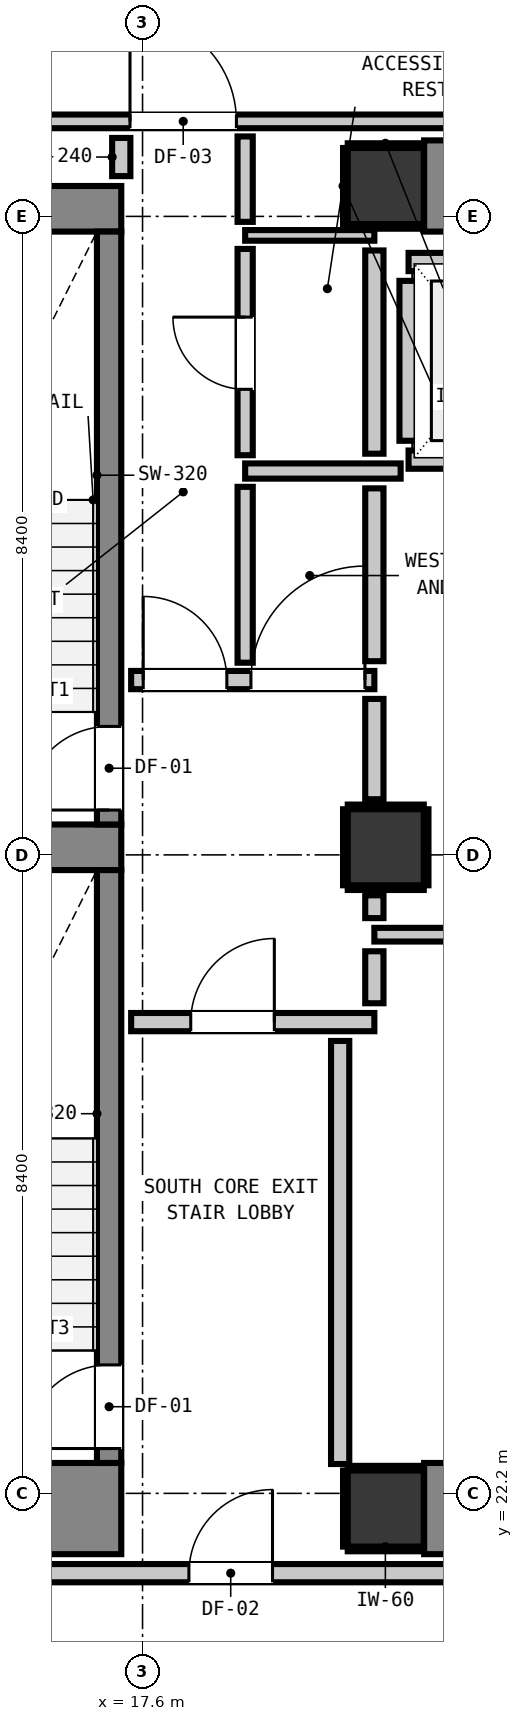
"""IFC4 building model, lengths in metres.
Left out: names, types, materials, properties, quantities, classifications, styles, units other than length and angle.
Written with IfcOpenShell. Run it as: python <this file> out.ifc"""

import sys

from ifc_helpers import new_model, si_unit, direction, frame, frame_2d, origin, origin_2d, place, context, subcontext, project, spatial, rectangle, extrude, element, fill, save


model = new_model("IFC4")
c1 = context("Model", 3, precision=1e-05, world=origin(), true_north=direction((0.0, 1.0)))
c2 = subcontext(c1, "Body", "Model", "MODEL_VIEW")
j1 = project(units=[si_unit("LENGTHUNIT", "METRE"), si_unit("PLANEANGLEUNIT", "RADIAN")], contexts=[c1])
p1 = place(None, origin())
s1 = spatial("IfcSite", under=j1, at=p1, CompositionType="ELEMENT")
p2 = place(p1, origin())
s2 = spatial("IfcBuilding", under=s1, at=p2, CompositionType="ELEMENT")
p3 = place(p2, frame((0.0, 0.0, 48.56)))
s3 = spatial("IfcBuildingStorey", under=s2, at=p3, CompositionType="ELEMENT", Elevation=48.56)
for number, where, z_axis, x_axis in (
    (1, (20.8, 22.0, 0.0), (0.0, 0.0, 1.0), (1.0, 0.0, 0.0)),
    (2, (20.8, 39.4, 0.0), (0.0, 0.0, 1.0), (1.0, 0.0, 0.0)),
):
    element("IfcColumn", number, at=place(p3, frame(where, z_axis=z_axis, x_axis=x_axis)), inside=s3, PredefinedType="COLUMN", context=c2, shape_type="SweptSolid", body=[
        extrude(rectangle(XDim=1.0, YDim=1.0, at=origin_2d()), origin(), (0.0, 0.0, 1.0), 3.32),
    ])
p4 = place(p3, frame((13.24, 22.0, 0.0), z_axis=(0.0, 0.0, 1.0), x_axis=(1.0, 0.0, 0.0)))
e3 = element("IfcWall", 3, at=p4, inside=s3, PredefinedType="SHEAR", context=c2, shape_type="SweptSolid", body=[
    extrude(rectangle(XDim=4.08, YDim=1.2, at=frame_2d((2.04, 0.0))), origin(), (0.0, 0.0, 1.0), 3.32),
])
p5 = place(p3, frame((13.24, 39.1, 0.0), z_axis=(0.0, 0.0, 1.0), x_axis=(1.0, 0.0, 0.0)))
e4 = element("IfcWall", 4, at=p5, inside=s3, PredefinedType="SHEAR", context=c2, shape_type="SweptSolid", body=[
    extrude(rectangle(XDim=4.08, YDim=0.6, at=frame_2d((2.04, 0.0))), origin(), (0.0, 0.0, 1.0), 3.32),
])
p6 = place(p3, frame((13.905, 30.7, 0.0), z_axis=(0.0, 0.0, 1.0), x_axis=(1.0, 0.0, 0.0)))
e5 = element("IfcWall", 5, at=p6, inside=s3, PredefinedType="SHEAR", context=c2, shape_type="SweptSolid", body=[
    extrude(rectangle(XDim=3.415, YDim=0.6, at=frame_2d((1.708, 0.0))), origin(), (0.0, 0.0, 1.0), 3.32),
])
for number, where, z_axis, x_axis in (
    (6, (21.305, 22.0, 0.0), (0.0, 0.0, 1.0), (1.0, 0.0, 0.0)),
    (7, (21.305, 39.4, 0.0), (0.0, 0.0, 1.0), (1.0, 0.0, 0.0)),
):
    element("IfcWall", number, at=place(p3, frame(where, z_axis=z_axis, x_axis=x_axis)), inside=s3, PredefinedType="SHEAR", context=c2, shape_type="SweptSolid", body=[
        extrude(rectangle(XDim=7.39, YDim=1.2, at=frame_2d((3.695, 0.0))), origin(), (0.0, 0.0, 1.0), 3.32),
    ])
p7 = place(p3, frame((17.16, 31.0, 0.0), z_axis=(0.0, 0.0, 1.0), x_axis=(0.0, 1.0, 0.0)))
e8 = element("IfcWall", 8, at=p7, inside=s3, PredefinedType="SHEAR", context=c2, shape_type="SweptSolid", body=[
    extrude(rectangle(XDim=7.8, YDim=0.32, at=frame_2d((3.9, 0.0))), origin(), (0.0, 0.0, 1.0), 3.32),
])
p8 = place(p7, frame((0.19, 0.0, 0.0)))
e9 = element("IfcOpeningElement", 9, at=p8, cuts=e8, PredefinedType="OPENING", context=c2, shape_type="SweptSolid", body=[
    extrude(rectangle(XDim=1.1, YDim=2.15, at=frame_2d((0.55, 1.075))), frame((0.0, 0.17, 0.0), z_axis=(0.0, -1.0, 0.0), x_axis=(1.0, 0.0, 0.0)), (0.0, 0.0, 1.0), 0.34),
])
p9 = place(p3, frame((17.16, 22.6, 0.0), z_axis=(0.0, 0.0, 1.0), x_axis=(0.0, 1.0, 0.0)))
e10 = element("IfcWall", 10, at=p9, inside=s3, PredefinedType="SHEAR", context=c2, shape_type="SweptSolid", body=[
    extrude(rectangle(XDim=7.8, YDim=0.32, at=frame_2d((3.9, 0.0))), origin(), (0.0, 0.0, 1.0), 3.32),
])
p10 = place(p9, frame((0.19, 0.0, 0.0)))
e11 = element("IfcOpeningElement", 11, at=p10, cuts=e10, PredefinedType="OPENING", context=c2, shape_type="SweptSolid", body=[
    extrude(rectangle(XDim=1.1, YDim=2.15, at=frame_2d((0.55, 1.075))), frame((0.0, 0.17, 0.0), z_axis=(0.0, -1.0, 0.0), x_axis=(1.0, 0.0, 0.0)), (0.0, 0.0, 1.0), 0.34),
])
p11 = place(p3, frame((20.8, 30.7, 0.0), z_axis=(0.0, 0.0, 1.0), x_axis=(1.0, 0.0, 0.0)))
e12 = element("IfcColumn", 12, at=p11, inside=s3, PredefinedType="COLUMN", context=c2, shape_type="SweptSolid", body=[
    extrude(rectangle(XDim=1.0, YDim=1.0, at=origin_2d()), origin(), (0.0, 0.0, 1.0), 3.32),
])
for number, where, z_axis, x_axis in (
    (13, (21.1, 35.8, 0.0), (0.0, 0.0, 1.0), (1.0, 0.0, 0.0)),
    (14, (21.1, 38.4, 0.0), (0.0, 0.0, 1.0), (1.0, 0.0, 0.0)),
):
    element("IfcWall", number, at=place(p3, frame(where, z_axis=z_axis, x_axis=x_axis)), inside=s3, PredefinedType="PARTITIONING", context=c2, shape_type="SweptSolid", body=[
        extrude(rectangle(XDim=2.2, YDim=0.24, at=frame_2d((1.1, 0.0))), origin(), (0.0, 0.0, 1.0), 3.06),
    ])
p12 = place(p3, frame((21.1, 36.048, 0.0), z_axis=(0.0, 0.0, 1.0), x_axis=(0.0, 1.0, 0.0)))
e15 = element("IfcWall", 15, at=p12, inside=s3, PredefinedType="PARTITIONING", context=c2, shape_type="SweptSolid", body=[
    extrude(rectangle(XDim=2.104, YDim=0.24, at=frame_2d((1.052, 0.0))), origin(), (0.0, 0.0, 1.0), 2.295),
])
p13 = place(p3, frame((10.15, 21.15, 0.0), z_axis=(0.0, 0.0, 1.0), x_axis=(1.0, 0.0, 0.0)))
e16 = element("IfcWall", 16, at=p13, inside=s3, PredefinedType="PARTITIONING", context=c2, shape_type="SweptSolid", body=[
    extrude(rectangle(XDim=40.023, YDim=0.24, at=frame_2d((20.012, 0.0))), origin(), (0.0, 0.0, 1.0), 3.06),
])
p14 = place(p13, frame((8.06, 0.0, 0.0)))
e17 = element("IfcOpeningElement", 17, at=p14, cuts=e16, PredefinedType="OPENING", context=c2, shape_type="SweptSolid", body=[
    extrude(rectangle(XDim=1.1, YDim=2.15, at=frame_2d((0.55, 1.075))), frame((0.0, 0.13, 0.0), z_axis=(0.0, -1.0, 0.0), x_axis=(1.0, 0.0, 0.0)), (0.0, 0.0, 1.0), 0.26),
])
p15 = place(p13, frame((0.324, 0.0, 0.0)))
e18 = element("IfcOpeningElement", 18, at=p15, cuts=e16, PredefinedType="OPENING", context=c2, shape_type="SweptSolid", body=[
    extrude(rectangle(XDim=1.4, YDim=2.15, at=frame_2d((0.7, 1.075))), frame((0.0, 0.13, 0.0), z_axis=(0.0, -1.0, 0.0), x_axis=(1.0, 0.0, 0.0)), (0.0, 0.0, 1.0), 0.26),
])
p16 = place(p13, frame((33.351, 0.0, 0.0)))
e19 = element("IfcOpeningElement", 19, at=p16, cuts=e16, PredefinedType="OPENING", context=c2, shape_type="SweptSolid", body=[
    extrude(rectangle(XDim=0.9, YDim=2.1, at=frame_2d((0.45, 1.05))), frame((0.0, 0.13, 0.0), z_axis=(0.0, -1.0, 0.0), x_axis=(1.0, 0.0, 0.0)), (0.0, 0.0, 1.0), 0.26),
])
p17 = place(p3, frame((17.45, 28.4, 0.0), z_axis=(0.0, 0.0, 1.0), x_axis=(1.0, 0.0, 0.0)))
e20 = element("IfcWall", 20, at=p17, inside=s3, PredefinedType="PARTITIONING", context=c2, shape_type="SweptSolid", body=[
    extrude(rectangle(XDim=3.2, YDim=0.24, at=frame_2d((1.6, 0.0))), origin(), (0.0, 0.0, 1.0), 3.06),
])
p18 = place(p17, frame((0.784, 0.0, 0.0)))
e21 = element("IfcOpeningElement", 21, at=p18, cuts=e20, PredefinedType="OPENING", context=c2, shape_type="SweptSolid", body=[
    extrude(rectangle(XDim=1.1, YDim=2.15, at=frame_2d((0.55, 1.075))), frame((0.0, 0.13, 0.0), z_axis=(0.0, -1.0, 0.0), x_axis=(1.0, 0.0, 0.0)), (0.0, 0.0, 1.0), 0.26),
])
p19 = place(p3, frame((17.45, 32.9, 0.0), z_axis=(0.0, 0.0, 1.0), x_axis=(1.0, 0.0, 0.0)))
e22 = element("IfcWall", 22, at=p19, inside=s3, PredefinedType="PARTITIONING", context=c2, shape_type="SweptSolid", body=[
    extrude(rectangle(XDim=3.2, YDim=0.24, at=frame_2d((1.6, 0.0))), origin(), (0.0, 0.0, 1.0), 3.06),
])
p20 = place(p19, frame((0.159, 0.0, 0.0)))
e23 = element("IfcOpeningElement", 23, at=p20, cuts=e22, PredefinedType="OPENING", context=c2, shape_type="SweptSolid", body=[
    extrude(rectangle(XDim=1.1, YDim=2.15, at=frame_2d((0.55, 1.075))), frame((0.0, 0.13, 0.0), z_axis=(0.0, -1.0, 0.0), x_axis=(1.0, 0.0, 0.0)), (0.0, 0.0, 1.0), 0.26),
])
p21 = place(p19, frame((1.576, 0.0, 0.0)))
e24 = element("IfcOpeningElement", 24, at=p21, cuts=e22, PredefinedType="OPENING", context=c2, shape_type="SweptSolid", body=[
    extrude(rectangle(XDim=1.5, YDim=2.15, at=frame_2d((0.75, 1.075))), frame((0.0, 0.13, 0.0), z_axis=(0.0, -1.0, 0.0), x_axis=(1.0, 0.0, 0.0)), (0.0, 0.0, 1.0), 0.26),
])
p22 = place(p3, frame((18.95, 35.65, 0.0), z_axis=(0.0, 0.0, 1.0), x_axis=(1.0, 0.0, 0.0)))
e25 = element("IfcWall", 25, at=p22, inside=s3, PredefinedType="PARTITIONING", context=c2, shape_type="SweptSolid", body=[
    extrude(rectangle(XDim=2.046, YDim=0.2, at=frame_2d((1.023, 0.0))), origin(), (0.0, 0.0, 1.0), 3.06),
])
p23 = place(p3, frame((20.65, 29.55, 0.0), z_axis=(0.0, 0.0, 1.0), x_axis=(1.0, 0.0, 0.0)))
e26 = element("IfcWall", 26, at=p23, inside=s3, PredefinedType="PARTITIONING", context=c2, shape_type="SweptSolid", body=[
    extrude(rectangle(XDim=9.325, YDim=0.18, at=frame_2d((4.663, 0.0))), origin(), (0.0, 0.0, 1.0), 3.06),
])
p24 = place(p3, frame((10.15, 40.25, 0.0), z_axis=(0.0, 0.0, 1.0), x_axis=(1.0, 0.0, 0.0)))
e27 = element("IfcWall", 27, at=p24, inside=s3, PredefinedType="PARTITIONING", context=c2, shape_type="SweptSolid", body=[
    extrude(rectangle(XDim=26.782, YDim=0.18, at=frame_2d((13.391, 0.0))), origin(), (0.0, 0.0, 1.0), 3.06),
])
p25 = place(p24, frame((7.285, 0.0, 0.0)))
e28 = element("IfcOpeningElement", 28, at=p25, cuts=e27, PredefinedType="OPENING", context=c2, shape_type="SweptSolid", body=[
    extrude(rectangle(XDim=1.4, YDim=2.15, at=frame_2d((0.7, 1.075))), frame((0.0, 0.1, 0.0), z_axis=(0.0, -1.0, 0.0), x_axis=(1.0, 0.0, 0.0)), (0.0, 0.0, 1.0), 0.2),
])
p26 = place(p24, frame((0.324, 0.0, 0.0)))
e29 = element("IfcOpeningElement", 29, at=p26, cuts=e27, PredefinedType="OPENING", context=c2, shape_type="SweptSolid", body=[
    extrude(rectangle(XDim=1.4, YDim=2.15, at=frame_2d((0.7, 1.075))), frame((0.0, 0.1, 0.0), z_axis=(0.0, -1.0, 0.0), x_axis=(1.0, 0.0, 0.0)), (0.0, 0.0, 1.0), 0.2),
])
p27 = place(p3, frame((18.95, 38.75, 0.0), z_axis=(0.0, 0.0, 1.0), x_axis=(1.0, 0.0, 0.0)))
e30 = element("IfcWall", 30, at=p27, inside=s3, PredefinedType="PARTITIONING", context=c2, shape_type="SweptSolid", body=[
    extrude(rectangle(XDim=1.7, YDim=0.14, at=frame_2d((0.85, 0.0))), origin(), (0.0, 0.0, 1.0), 3.06),
])
p28 = place(p3, frame((17.32, 39.53, 0.0), z_axis=(0.0, 0.0, 1.0), x_axis=(0.0, 1.0, 0.0)))
e31 = element("IfcWall", 31, at=p28, inside=s3, PredefinedType="PARTITIONING", context=c2, shape_type="SweptSolid", body=[
    extrude(rectangle(XDim=0.502, YDim=0.24, at=frame_2d((0.251, 0.0))), origin(), (0.0, 0.0, 1.0), 3.06),
])
p29 = place(p3, frame((20.2, 22.586, 0.0), z_axis=(0.0, 0.0, 1.0), x_axis=(0.0, 1.0, 0.0)))
e32 = element("IfcWall", 32, at=p29, inside=s3, PredefinedType="PARTITIONING", context=c2, shape_type="SweptSolid", body=[
    extrude(rectangle(XDim=5.566, YDim=0.24, at=frame_2d((2.783, 0.0))), origin(), (0.0, 0.0, 1.0), 3.06),
])
p30 = place(p3, frame((20.65, 28.648, 0.0), z_axis=(0.0, 0.0, 1.0), x_axis=(0.0, 1.0, 0.0)))
e33 = element("IfcWall", 33, at=p30, inside=s3, PredefinedType="PARTITIONING", context=c2, shape_type="SweptSolid", body=[
    extrude(rectangle(XDim=0.684, YDim=0.24, at=frame_2d((0.342, 0.0))), origin(), (0.0, 0.0, 1.0), 2.295),
])
p31 = place(p3, frame((20.65, 29.768, 0.0), z_axis=(0.0, 0.0, 1.0), x_axis=(0.0, 1.0, 0.0)))
e34 = element("IfcWall", 34, at=p31, inside=s3, PredefinedType="PARTITIONING", context=c2, shape_type="SweptSolid", body=[
    extrude(rectangle(XDim=0.3, YDim=0.24, at=frame_2d((0.15, 0.0))), origin(), (0.0, 0.0, 1.0), 2.295),
])
p32 = place(p3, frame((20.65, 31.332, 0.0), z_axis=(0.0, 0.0, 1.0), x_axis=(0.0, 1.0, 0.0)))
e35 = element("IfcWall", 35, at=p32, inside=s3, PredefinedType="PARTITIONING", context=c2, shape_type="SweptSolid", body=[
    extrude(rectangle(XDim=1.32, YDim=0.24, at=frame_2d((0.66, 0.0))), origin(), (0.0, 0.0, 1.0), 2.295),
])
p33 = place(p3, frame((20.65, 33.148, 0.0), z_axis=(0.0, 0.0, 1.0), x_axis=(0.0, 1.0, 0.0)))
e36 = element("IfcWall", 36, at=p33, inside=s3, PredefinedType="PARTITIONING", context=c2, shape_type="SweptSolid", body=[
    extrude(rectangle(XDim=2.274, YDim=0.24, at=frame_2d((1.137, 0.0))), origin(), (0.0, 0.0, 1.0), 2.295),
])
p34 = place(p3, frame((20.65, 35.878, 0.0), z_axis=(0.0, 0.0, 1.0), x_axis=(0.0, 1.0, 0.0)))
e37 = element("IfcWall", 37, at=p34, inside=s3, PredefinedType="PARTITIONING", context=c2, shape_type="SweptSolid", body=[
    extrude(rectangle(XDim=2.674, YDim=0.24, at=frame_2d((1.337, 0.0))), origin(), (0.0, 0.0, 1.0), 2.295),
])
p35 = place(p3, frame((18.95, 33.128, 0.0), z_axis=(0.0, 0.0, 1.0), x_axis=(0.0, 1.0, 0.0)))
e38 = element("IfcWall", 38, at=p35, inside=s3, PredefinedType="PARTITIONING", context=c2, shape_type="SweptSolid", body=[
    extrude(rectangle(XDim=2.314, YDim=0.2, at=frame_2d((1.157, 0.0))), origin(), (0.0, 0.0, 1.0), 3.06),
])
p36 = place(p3, frame((18.95, 35.858, 0.0), z_axis=(0.0, 0.0, 1.0), x_axis=(0.0, 1.0, 0.0)))
e39 = element("IfcWall", 39, at=p36, inside=s3, PredefinedType="PARTITIONING", context=c2, shape_type="SweptSolid", body=[
    extrude(rectangle(XDim=2.714, YDim=0.2, at=frame_2d((1.357, 0.0))), origin(), (0.0, 0.0, 1.0), 3.06),
])
p37 = place(p36, frame((0.867, 0.0, 0.0)))
e40 = element("IfcOpeningElement", 40, at=p37, cuts=e39, PredefinedType="OPENING", context=c2, shape_type="SweptSolid", body=[
    extrude(rectangle(XDim=0.95, YDim=2.1, at=frame_2d((0.475, 1.05))), frame((0.0, 0.11, 0.0), z_axis=(0.0, -1.0, 0.0), x_axis=(1.0, 0.0, 0.0)), (0.0, 0.0, 1.0), 0.22),
])
p38 = place(p3, frame((18.95, 38.928, 0.0), z_axis=(0.0, 0.0, 1.0), x_axis=(0.0, 1.0, 0.0)))
e41 = element("IfcWall", 41, at=p38, inside=s3, PredefinedType="PARTITIONING", context=c2, shape_type="SweptSolid", body=[
    extrude(rectangle(XDim=1.124, YDim=0.2, at=frame_2d((0.562, 0.0))), origin(), (0.0, 0.0, 1.0), 3.06),
])
for number, where, z_axis, x_axis in (
    (42, (20.3, 21.468, 0.0), (0.0, 0.0, 1.0), (1.0, 0.0, 0.0)),
    (43, (20.3, 22.532, 0.0), (0.0, 0.0, 1.0), (1.0, 0.0, 0.0)),
):
    element("IfcWall", number, at=place(p3, frame(where, z_axis=z_axis, x_axis=x_axis)), inside=s3, PredefinedType="PARTITIONING", context=c2, shape_type="SweptSolid", body=[
        extrude(rectangle(XDim=0.99, YDim=0.06, at=frame_2d((0.495, 0.0))), origin(), (0.0, 0.0, 1.0), 1.45),
    ])
p39 = place(p3, frame((20.268, 21.5, 0.0), z_axis=(0.0, 0.0, 1.0), x_axis=(0.0, 1.0, 0.0)))
e44 = element("IfcWall", 44, at=p39, inside=s3, PredefinedType="PARTITIONING", context=c2, shape_type="SweptSolid", body=[
    extrude(rectangle(XDim=1.0, YDim=0.06, at=frame_2d((0.5, 0.0))), origin(), (0.0, 0.0, 1.0), 1.45),
])
for number, where, z_axis, x_axis in (
    (45, (20.3, 38.868, 0.0), (0.0, 0.0, 1.0), (1.0, 0.0, 0.0)),
    (46, (20.3, 39.932, 0.0), (0.0, 0.0, 1.0), (1.0, 0.0, 0.0)),
):
    element("IfcWall", number, at=place(p3, frame(where, z_axis=z_axis, x_axis=x_axis)), inside=s3, PredefinedType="PARTITIONING", context=c2, shape_type="SweptSolid", body=[
        extrude(rectangle(XDim=0.99, YDim=0.06, at=frame_2d((0.495, 0.0))), origin(), (0.0, 0.0, 1.0), 1.45),
    ])
for number, where, z_axis, x_axis in (
    (47, (20.268, 38.9, 0.0), (0.0, 0.0, 1.0), (0.0, 1.0, 0.0)),
    (48, (20.3, 30.168, 0.0), (0.0, 0.0, 1.0), (1.0, 0.0, 0.0)),
    (49, (20.3, 31.232, 0.0), (0.0, 0.0, 1.0), (1.0, 0.0, 0.0)),
    (50, (20.268, 30.2, 0.0), (0.0, 0.0, 1.0), (0.0, 1.0, 0.0)),
    (51, (21.332, 30.2, 0.0), (0.0, 0.0, 1.0), (0.0, 1.0, 0.0)),
):
    element("IfcWall", number, at=place(p3, frame(where, z_axis=z_axis, x_axis=x_axis)), inside=s3, PredefinedType="PARTITIONING", context=c2, shape_type="SweptSolid", body=[
        extrude(rectangle(XDim=1.0, YDim=0.06, at=frame_2d((0.5, 0.0))), origin(), (0.0, 0.0, 1.0), 1.45),
    ])
p40 = place(p8, origin())
e52 = element("IfcDoor", 52, at=p40, inside=s3, OperationType="SINGLE_SWING_LEFT", PredefinedType="DOOR", context=c2, shape_type="SweptSolid", body=[
    extrude(rectangle(XDim=1.1, YDim=2.15, at=frame_2d((0.55, 1.075))), frame((0.0, 0.025, 0.0), z_axis=(0.0, -1.0, 0.0), x_axis=(1.0, 0.0, 0.0)), (0.0, 0.0, 1.0), 0.05),
])
fill(e9, e52)
p41 = place(p10, origin())
e53 = element("IfcDoor", 53, at=p41, inside=s3, OperationType="SINGLE_SWING_LEFT", PredefinedType="DOOR", context=c2, shape_type="SweptSolid", body=[
    extrude(rectangle(XDim=1.1, YDim=2.15, at=frame_2d((0.55, 1.075))), frame((0.0, 0.025, 0.0), z_axis=(0.0, -1.0, 0.0), x_axis=(1.0, 0.0, 0.0)), (0.0, 0.0, 1.0), 0.05),
])
fill(e11, e53)
p42 = place(p18, origin())
e54 = element("IfcDoor", 54, at=p42, inside=s3, OperationType="SINGLE_SWING_RIGHT", PredefinedType="DOOR", context=c2, shape_type="SweptSolid", body=[
    extrude(rectangle(XDim=1.1, YDim=2.15, at=frame_2d((0.55, 1.075))), frame((0.0, 0.025, 0.0), z_axis=(0.0, -1.0, 0.0), x_axis=(1.0, 0.0, 0.0)), (0.0, 0.0, 1.0), 0.05),
])
fill(e21, e54)
p43 = place(p20, origin())
e55 = element("IfcDoor", 55, at=p43, inside=s3, OperationType="SINGLE_SWING_LEFT", PredefinedType="DOOR", context=c2, shape_type="SweptSolid", body=[
    extrude(rectangle(XDim=1.1, YDim=2.15, at=frame_2d((0.55, 1.075))), frame((0.0, 0.025, 0.0), z_axis=(0.0, -1.0, 0.0), x_axis=(1.0, 0.0, 0.0)), (0.0, 0.0, 1.0), 0.05),
])
fill(e23, e55)
p44 = place(p14, origin())
e56 = element("IfcDoor", 56, at=p44, inside=s3, OperationType="SINGLE_SWING_RIGHT", PredefinedType="DOOR", context=c2, shape_type="SweptSolid", body=[
    extrude(rectangle(XDim=1.1, YDim=2.15, at=frame_2d((0.55, 1.075))), frame((0.0, 0.025, 0.0), z_axis=(0.0, -1.0, 0.0), x_axis=(1.0, 0.0, 0.0)), (0.0, 0.0, 1.0), 0.05),
])
fill(e17, e56)
p45 = place(p25, origin())
e57 = element("IfcDoor", 57, at=p45, inside=s3, OperationType="SINGLE_SWING_LEFT", PredefinedType="DOOR", context=c2, shape_type="SweptSolid", body=[
    extrude(rectangle(XDim=1.4, YDim=2.15, at=frame_2d((0.7, 1.075))), frame((0.0, 0.025, 0.0), z_axis=(0.0, -1.0, 0.0), x_axis=(1.0, 0.0, 0.0)), (0.0, 0.0, 1.0), 0.05),
])
fill(e28, e57)
p46 = place(p21, origin())
e58 = element("IfcDoor", 58, at=p46, inside=s3, OperationType="SINGLE_SWING_RIGHT", PredefinedType="DOOR", context=c2, shape_type="SweptSolid", body=[
    extrude(rectangle(XDim=1.5, YDim=2.15, at=frame_2d((0.75, 1.075))), frame((0.0, 0.025, 0.0), z_axis=(0.0, -1.0, 0.0), x_axis=(1.0, 0.0, 0.0)), (0.0, 0.0, 1.0), 0.05),
])
fill(e24, e58)
p47 = place(p37, origin())
e59 = element("IfcDoor", 59, at=p47, inside=s3, OperationType="SINGLE_SWING_RIGHT", PredefinedType="DOOR", context=c2, shape_type="SweptSolid", body=[
    extrude(rectangle(XDim=0.95, YDim=2.1, at=frame_2d((0.475, 1.05))), frame((0.0, 0.025, 0.0), z_axis=(0.0, -1.0, 0.0), x_axis=(1.0, 0.0, 0.0)), (0.0, 0.0, 1.0), 0.05),
])
fill(e40, e59)
save(model, sys.argv[1])
